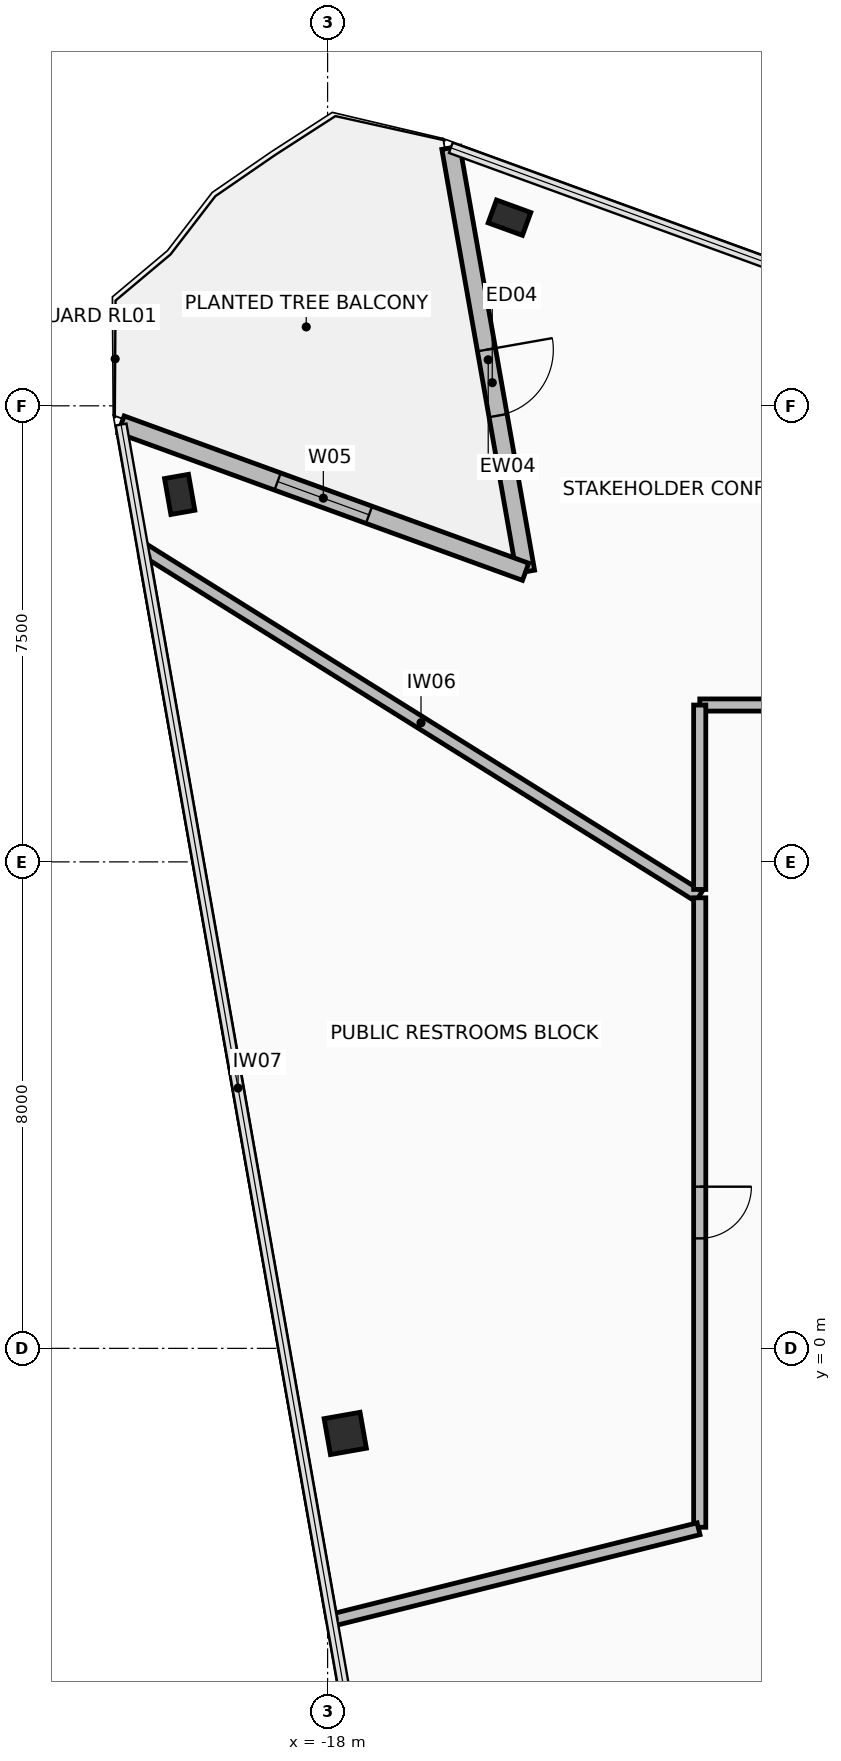
"""IFC4 building model, lengths in metres.
Left out: names, types, materials, properties, quantities, classifications, styles, units other than length and angle.
Written with IfcOpenShell. Run it as: python <this file> out.ifc"""

import sys

from ifc_helpers import new_model, si_unit, direction, frame, frame_2d, origin, origin_2d, place, context, subcontext, project, spatial, rectangle, hollow_rectangle, extrude, element, fill, save


model = new_model("IFC4")
c1 = context("Model", 3, precision=1e-05, world=origin(), true_north=direction((0.0, 1.0)))
c2 = subcontext(c1, "Body", "Model", "MODEL_VIEW")
j1 = project(units=[si_unit("LENGTHUNIT", "METRE"), si_unit("PLANEANGLEUNIT", "RADIAN")], contexts=[c1])
p1 = place(None, origin())
s1 = spatial("IfcSite", under=j1, at=p1, CompositionType="ELEMENT")
p2 = place(p1, origin())
s2 = spatial("IfcBuilding", under=s1, at=p2, CompositionType="ELEMENT")
p3 = place(p2, frame((0.0, 0.0, 174.1)))
s3 = spatial("IfcBuildingStorey", under=s2, at=p3, CompositionType="ELEMENT", Elevation=174.1)
p4 = place(p3, frame((-20.433, 14.043, 0.0), z_axis=(0.0, 0.0, 1.0), x_axis=(-0.173648177667, 0.984807753012, 0.0)))
e1 = element("IfcColumn", 1, at=p4, inside=s3, PredefinedType="COLUMN", context=c2, shape_type="SweptSolid", body=[
    extrude(hollow_rectangle(XDim=0.4, YDim=0.6, WallThickness=0.03, at=origin_2d()), origin(), (0.0, 0.0, 1.0), 3.6),
])
p5 = place(p3, frame((-17.71, -1.399, 0.0), z_axis=(0.0, 0.0, 1.0), x_axis=(-0.173648177667, 0.984807753012, 0.0)))
e2 = element("IfcColumn", 2, at=p5, inside=s3, PredefinedType="COLUMN", context=c2, shape_type="SweptSolid", body=[
    extrude(hollow_rectangle(XDim=0.6, YDim=0.6, WallThickness=0.036, at=origin_2d()), origin(), (0.0, 0.0, 1.0), 3.6),
])
p6 = place(p3, frame((-15.009, 18.594, 0.0), z_axis=(0.0, 0.0, 1.0), x_axis=(-0.939692023847, 0.342021783398, 0.0)))
e3 = element("IfcColumn", 3, at=p6, inside=s3, PredefinedType="COLUMN", context=c2, shape_type="SweptSolid", body=[
    extrude(hollow_rectangle(XDim=0.4, YDim=0.6, WallThickness=0.03, at=origin_2d()), origin(), (0.0, 0.0, 1.0), 3.6),
])
p7 = place(p3, frame((-15.973, 19.743, 0.0), z_axis=(0.0, 0.0, 1.0), x_axis=(0.173651569749, -0.984807154891, 0.0)))
e4 = element("IfcWall", 4, at=p7, inside=s3, PredefinedType="STANDARD", context=c2, shape_type="SweptSolid", body=[
    extrude(rectangle(XDim=7.08, YDim=0.3, at=frame_2d((3.54, 0.0))), origin(), (0.0, 0.0, 1.0), 2.715),
])
p8 = place(p7, frame((3.372, 0.0, 0.0)))
e5 = element("IfcOpeningElement", 5, at=p8, cuts=e4, PredefinedType="OPENING", context=c2, shape_type="SweptSolid", body=[
    extrude(rectangle(XDim=1.1, YDim=2.2, at=frame_2d((0.55, 1.1))), frame((0.0, 0.16, 0.0), z_axis=(0.0, -1.0, 0.0), x_axis=(1.0, 0.0, 0.0)), (0.0, 0.0, 1.0), 0.32),
])
p9 = place(p3, frame((-14.744, 12.771, 0.0), z_axis=(0.0, 0.0, 1.0), x_axis=(-0.939687665182, 0.342033758429, 0.0)))
e6 = element("IfcWall", 6, at=p9, inside=s3, PredefinedType="STANDARD", context=c2, shape_type="SweptSolid", body=[
    extrude(rectangle(XDim=7.08, YDim=0.3, at=frame_2d((3.54, 0.0))), origin(), (0.0, 0.0, 1.0), 2.715),
])
p10 = place(p9, frame((2.74, 0.0, 0.335)))
e7 = element("IfcOpeningElement", 7, at=p10, cuts=e6, PredefinedType="OPENING", context=c2, shape_type="SweptSolid", body=[
    extrude(rectangle(XDim=1.6, YDim=2.2, at=frame_2d((0.8, 1.1))), frame((0.0, 0.16, 0.0), z_axis=(0.0, -1.0, 0.0), x_axis=(1.0, 0.0, 0.0)), (0.0, 0.0, 1.0), 0.32),
])
p11 = place(p3, frame((-21.036, 13.145, 0.0), z_axis=(0.0, 0.0, 1.0), x_axis=(0.848050455258, -0.529915488863, 0.0)))
e8 = element("IfcWall", 8, at=p11, inside=s3, PredefinedType="PARTITIONING", context=c2, shape_type="SweptSolid", body=[
    extrude(rectangle(XDim=10.782, YDim=0.2, at=frame_2d((5.391, 0.0))), origin(), (0.0, 0.0, 1.0), 2.715),
])
p12 = place(p3, frame((-11.88, 7.41, 0.0), z_axis=(0.0, 0.0, 1.0), x_axis=(0.0, -1.0, 0.0)))
e9 = element("IfcWall", 9, at=p12, inside=s3, PredefinedType="PARTITIONING", context=c2, shape_type="SweptSolid", body=[
    extrude(rectangle(XDim=10.352, YDim=0.2, at=frame_2d((5.176, 0.0))), origin(), (0.0, 0.0, 1.0), 3.42),
])
p13 = place(p12, frame((4.751, 0.0, 0.0)))
e10 = element("IfcOpeningElement", 10, at=p13, cuts=e9, PredefinedType="OPENING", context=c2, shape_type="SweptSolid", body=[
    extrude(rectangle(XDim=0.85, YDim=2.1, at=frame_2d((0.425, 1.05))), frame((0.0, 0.11, 0.0), z_axis=(0.0, -1.0, 0.0), x_axis=(1.0, 0.0, 0.0)), (0.0, 0.0, 1.0), 0.22),
])
p14 = place(p3, frame((-11.899, -2.967, 0.0), z_axis=(0.0, 0.0, 1.0), x_axis=(-0.970297784216, -0.241913641505, 0.0)))
e11 = element("IfcWall", 11, at=p14, inside=s3, PredefinedType="PARTITIONING", context=c2, shape_type="SweptSolid", body=[
    extrude(rectangle(XDim=6.188, YDim=0.2, at=frame_2d((3.094, 0.0))), origin(), (0.0, 0.0, 1.0), 2.715),
])
p15 = place(p3, frame((-17.934, -4.444, 0.0), z_axis=(0.0, 0.0, 1.0), x_axis=(-0.173637559084, 0.984809625296, 0.0)))
e12 = element("IfcWall", 12, at=p15, inside=s3, PredefinedType="PARTITIONING", context=c2, shape_type="SweptSolid", body=[
    extrude(rectangle(XDim=17.719, YDim=0.15, at=frame_2d((8.859, 0.0))), origin(), (0.0, 0.0, 1.0), 3.42),
])
p16 = place(p3, frame((-2.356, 10.58, 0.0), z_axis=(0.0, 0.0, 1.0), x_axis=(-1.0, 0.0, 0.0)))
e13 = element("IfcWall", 13, at=p16, inside=s3, PredefinedType="PARTITIONING", context=c2, shape_type="SweptSolid", body=[
    extrude(rectangle(XDim=9.523, YDim=0.2, at=frame_2d((4.762, 0.0))), origin(), (0.0, 0.0, 1.0), 2.765),
])
p17 = place(p16, frame((4.162, 0.0, 0.0)))
e14 = element("IfcOpeningElement", 14, at=p17, cuts=e13, PredefinedType="OPENING", context=c2, shape_type="SweptSolid", body=[
    extrude(rectangle(XDim=1.2, YDim=2.15, at=frame_2d((0.6, 1.075))), frame((0.0, 0.11, 0.0), z_axis=(0.0, -1.0, 0.0), x_axis=(1.0, 0.0, 0.0)), (0.0, 0.0, 1.0), 0.22),
])
p18 = place(p3, frame((-11.88, 10.579, 0.0), z_axis=(0.0, 0.0, 1.0), x_axis=(0.0, -1.0, 0.0)))
e15 = element("IfcWall", 15, at=p18, inside=s3, PredefinedType="PARTITIONING", context=c2, shape_type="SweptSolid", body=[
    extrude(rectangle(XDim=3.032, YDim=0.2, at=frame_2d((1.516, 0.0))), origin(), (0.0, 0.0, 1.0), 2.765),
])
p19 = place(p8, origin())
e16 = element("IfcDoor", 16, at=p19, inside=s3, OperationType="SINGLE_SWING_LEFT", PredefinedType="DOOR", context=c2, shape_type="SweptSolid", body=[
    extrude(rectangle(XDim=1.1, YDim=2.2, at=frame_2d((0.55, 1.1))), frame((0.0, 0.025, 0.0), z_axis=(0.0, -1.0, 0.0), x_axis=(1.0, 0.0, 0.0)), (0.0, 0.0, 1.0), 0.05),
])
fill(e5, e16)
p20 = place(p10, origin())
e17 = element("IfcWindow", 17, at=p20, inside=s3, PartitioningType="SINGLE_PANEL", PredefinedType="WINDOW", context=c2, shape_type="SweptSolid", body=[
    extrude(rectangle(XDim=1.6, YDim=2.2, at=frame_2d((0.8, 1.1))), frame((0.0, 0.03, 0.0), z_axis=(0.0, -1.0, 0.0), x_axis=(1.0, 0.0, 0.0)), (0.0, 0.0, 1.0), 0.06),
])
fill(e7, e17)
p21 = place(p13, origin())
e18 = element("IfcDoor", 18, at=p21, inside=s3, OperationType="SINGLE_SWING_RIGHT", PredefinedType="DOOR", context=c2, shape_type="SweptSolid", body=[
    extrude(rectangle(XDim=0.85, YDim=2.1, at=frame_2d((0.425, 1.05))), frame((0.0, 0.025, 0.0), z_axis=(0.0, -1.0, 0.0), x_axis=(1.0, 0.0, 0.0)), (0.0, 0.0, 1.0), 0.05),
])
fill(e10, e18)
save(model, sys.argv[1])
